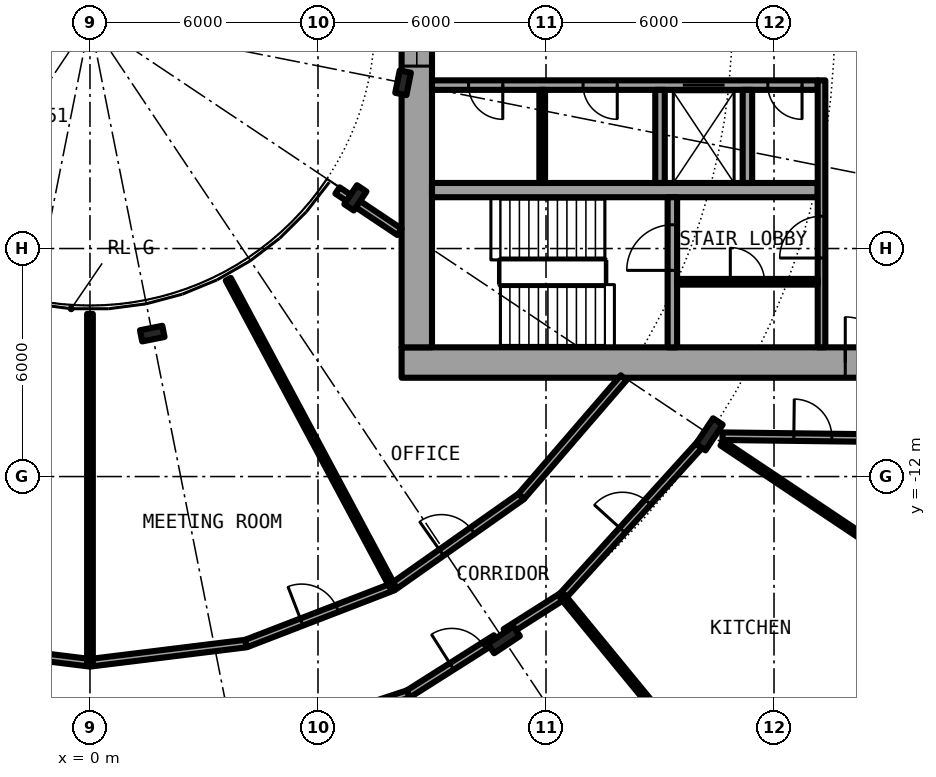
"""IFC4 building model, lengths in metres.
Left out: names, types, materials, properties, quantities, classifications, styles, units other than length and angle.
Written with IfcOpenShell. Run it as: python <this file> out.ifc"""

import sys

from ifc_helpers import new_model, si_unit, direction, frame, frame_2d, origin, origin_2d, place, context, subcontext, project, spatial, rectangle, i_section, extrude, element, fill, save


model = new_model("IFC4")
c1 = context("Model", 3, precision=1e-05, world=origin(), true_north=direction((0.0, 1.0)))
c2 = subcontext(c1, "Body", "Model", "MODEL_VIEW")
j1 = project(units=[si_unit("LENGTHUNIT", "METRE"), si_unit("PLANEANGLEUNIT", "RADIAN")], contexts=[c1])
p1 = place(None, origin())
s1 = spatial("IfcSite", under=j1, at=p1, CompositionType="ELEMENT")
p2 = place(p1, origin())
s2 = spatial("IfcBuilding", under=s1, at=p2, CompositionType="ELEMENT")
p3 = place(p2, frame((0.0, 0.0, 9.6)))
s3 = spatial("IfcBuildingStorey", under=s2, at=p3, CompositionType="ELEMENT", Elevation=9.6)
for number, where, z_axis, x_axis in (
    (1, (10.889, -16.297, 0.0), (0.0, 0.0, 1.0), (0.556, -0.831, 0.0)),
    (2, (16.297, -10.889, 0.0), (0.0, 0.0, 1.0), (0.831, -0.556, 0.0)),
):
    element("IfcColumn", number, at=place(p3, frame(where, z_axis=z_axis, x_axis=x_axis)), inside=s3, PredefinedType="COLUMN", context=c2, shape_type="SweptSolid", body=[
        extrude(i_section(OverallWidth=0.303, OverallDepth=0.814, WebThickness=0.021, FlangeThickness=0.04, FilletRadius=0.03, at=origin_2d()), origin(), (0.0, 0.0, 1.0), 4.5),
    ])
for number, where, z_axis, x_axis in (
    (3, (1.639, -8.239, 0.0), (0.0, 0.0, 1.0), (0.195, -0.981, 0.0)),
    (4, (6.984, -4.667, 0.0), (0.0, 0.0, 1.0), (0.831, -0.556, 0.0)),
    (5, (8.239, -1.639, 0.0), (0.0, 0.0, 1.0), (0.981, -0.195, 0.0)),
):
    element("IfcColumn", number, at=place(p3, frame(where, z_axis=z_axis, x_axis=x_axis)), inside=s3, PredefinedType="COLUMN", context=c2, shape_type="SweptSolid", body=[
        extrude(i_section(OverallWidth=0.3, OverallDepth=0.6, WebThickness=0.015, FlangeThickness=0.03, FilletRadius=0.027, at=origin_2d()), origin(), (0.0, 0.0, 1.0), 4.5),
    ])
p4 = place(p3, frame((8.2, -9.0, 0.0), z_axis=(0.0, 0.0, 1.0), x_axis=(1.0, 0.0, 0.0)))
e6 = element("IfcWall", 6, at=p4, inside=s3, PredefinedType="SHEAR", context=c2, shape_type="SweptSolid", body=[
    extrude(rectangle(XDim=14.2, YDim=0.8, at=frame_2d((7.1, 0.0))), origin(), (0.0, 0.0, 1.0), 4.5),
])
p5 = place(p4, frame((11.675, 0.0, 0.0)))
e7 = element("IfcOpeningElement", 7, at=p5, cuts=e6, PredefinedType="OPENING", context=c2, shape_type="SweptSolid", body=[
    extrude(rectangle(XDim=1.2, YDim=2.3, at=frame_2d((0.6, 1.15))), frame((0.0, 0.41, 0.0), z_axis=(0.0, -1.0, 0.0), x_axis=(1.0, 0.0, 0.0)), (0.0, 0.0, 1.0), 0.82),
])
p6 = place(p3, frame((8.6, -8.6, 0.0), z_axis=(0.0, 0.0, 1.0), x_axis=(0.0, 1.0, 0.0)))
e8 = element("IfcWall", 8, at=p6, inside=s3, PredefinedType="SHEAR", context=c2, shape_type="SweptSolid", body=[
    extrude(rectangle(XDim=17.2, YDim=0.8, at=frame_2d((8.6, 0.0))), origin(), (0.0, 0.0, 1.0), 4.5),
])
p7 = place(p6, frame((7.4, 0.0, 0.1)))
e9 = element("IfcOpeningElement", 9, at=p7, cuts=e8, PredefinedType="OPENING", context=c2, shape_type="SweptSolid", body=[
    extrude(rectangle(XDim=2.4, YDim=2.2, at=frame_2d((1.2, 1.1))), frame((0.0, 0.41, 0.0), z_axis=(0.0, -1.0, 0.0), x_axis=(1.0, 0.0, 0.0)), (0.0, 0.0, 1.0), 0.82),
])
p8 = place(p3, frame((19.15, -1.7, 0.0), z_axis=(0.0, 0.0, 1.0), x_axis=(-1.0, 0.0, 0.0)))
e10 = element("IfcWall", 10, at=p8, inside=s3, PredefinedType="SHEAR", context=c2, shape_type="SweptSolid", body=[
    extrude(rectangle(XDim=10.15, YDim=0.25, at=frame_2d((5.075, 0.0))), origin(), (0.0, 0.0, 1.0), 4.5),
])
p9 = place(p8, frame((2.45, 0.0, 0.0)))
e11 = element("IfcOpeningElement", 11, at=p9, cuts=e10, PredefinedType="OPENING", context=c2, shape_type="SweptSolid", body=[
    extrude(rectangle(XDim=1.1, YDim=2.3, at=frame_2d((0.55, 1.15))), frame((0.0, 0.135, 0.0), z_axis=(0.0, -1.0, 0.0), x_axis=(1.0, 0.0, 0.0)), (0.0, 0.0, 1.0), 0.27),
])
p10 = place(p8, frame((8.288, 0.0, 0.0)))
e12 = element("IfcOpeningElement", 12, at=p10, cuts=e10, PredefinedType="OPENING", context=c2, shape_type="SweptSolid", body=[
    extrude(rectangle(XDim=0.9, YDim=2.3, at=frame_2d((0.45, 1.15))), frame((0.0, 0.135, 0.0), z_axis=(0.0, -1.0, 0.0), x_axis=(1.0, 0.0, 0.0)), (0.0, 0.0, 1.0), 0.27),
])
p11 = place(p8, frame((5.275, 0.0, 0.0)))
e13 = element("IfcOpeningElement", 13, at=p11, cuts=e10, PredefinedType="OPENING", context=c2, shape_type="SweptSolid", body=[
    extrude(rectangle(XDim=0.9, YDim=2.3, at=frame_2d((0.45, 1.15))), frame((0.0, 0.135, 0.0), z_axis=(0.0, -1.0, 0.0), x_axis=(1.0, 0.0, 0.0)), (0.0, 0.0, 1.0), 0.27),
])
p12 = place(p8, frame((0.413, 0.0, 0.0)))
e14 = element("IfcOpeningElement", 14, at=p12, cuts=e10, PredefinedType="OPENING", context=c2, shape_type="SweptSolid", body=[
    extrude(rectangle(XDim=0.9, YDim=2.3, at=frame_2d((0.45, 1.15))), frame((0.0, 0.135, 0.0), z_axis=(0.0, -1.0, 0.0), x_axis=(1.0, 0.0, 0.0)), (0.0, 0.0, 1.0), 0.27),
])
p13 = place(p3, frame((9.0, -4.462, 0.0), z_axis=(0.0, 0.0, 1.0), x_axis=(1.0, 0.0, 0.0)))
e15 = element("IfcWall", 15, at=p13, inside=s3, PredefinedType="SHEAR", context=c2, shape_type="SweptSolid", body=[
    extrude(rectangle(XDim=10.15, YDim=0.375, at=frame_2d((5.075, 0.0))), origin(), (0.0, 0.0, 1.0), 4.5),
])
p14 = place(p3, frame((15.325, -8.6, 0.0), z_axis=(0.0, 0.0, 1.0), x_axis=(0.0, 1.0, 0.0)))
e16 = element("IfcWall", 16, at=p14, inside=s3, PredefinedType="SHEAR", context=c2, shape_type="SweptSolid", body=[
    extrude(rectangle(XDim=3.95, YDim=0.25, at=frame_2d((1.975, 0.0))), origin(), (0.0, 0.0, 1.0), 4.5),
])
p15 = place(p14, frame((2.025, 0.0, 0.0)))
e17 = element("IfcOpeningElement", 17, at=p15, cuts=e16, PredefinedType="OPENING", context=c2, shape_type="SweptSolid", body=[
    extrude(rectangle(XDim=1.2, YDim=2.3, at=frame_2d((0.6, 1.15))), frame((0.0, 0.135, 0.0), z_axis=(0.0, -1.0, 0.0), x_axis=(1.0, 0.0, 0.0)), (0.0, 0.0, 1.0), 0.27),
])
for number, where, z_axis, x_axis in (
    (18, (15.0, -1.825, 0.0), (0.0, 0.0, 1.0), (0.0, -1.0, 0.0)),
    (19, (17.3, -1.825, 0.0), (0.0, 0.0, 1.0), (0.0, -1.0, 0.0)),
):
    element("IfcWall", number, at=place(p3, frame(where, z_axis=z_axis, x_axis=x_axis)), inside=s3, PredefinedType="SOLIDWALL", context=c2, shape_type="SweptSolid", body=[
        extrude(rectangle(XDim=2.45, YDim=0.25, at=frame_2d((1.225, 0.0))), origin(), (0.0, 0.0, 1.0), 4.05),
    ])
p16 = place(p3, frame((19.25, -8.6, 0.0), z_axis=(0.0, 0.0, 1.0), x_axis=(0.0, 1.0, 0.0)))
e20 = element("IfcWall", 20, at=p16, inside=s3, PredefinedType="SOLIDWALL", context=c2, shape_type="SweptSolid", body=[
    extrude(rectangle(XDim=7.025, YDim=0.2, at=frame_2d((3.513, 0.0))), origin(), (0.0, 0.0, 1.0), 4.05),
])
p17 = place(p16, frame((2.35, 0.0, 0.0)))
e21 = element("IfcOpeningElement", 21, at=p17, cuts=e20, PredefinedType="OPENING", context=c2, shape_type="SweptSolid", body=[
    extrude(rectangle(XDim=1.1, YDim=2.3, at=frame_2d((0.55, 1.15))), frame((0.0, 0.11, 0.0), z_axis=(0.0, -1.0, 0.0), x_axis=(1.0, 0.0, 0.0)), (0.0, 0.0, 1.0), 0.22),
])
p18 = place(p3, frame((11.9, -1.825, 0.0), z_axis=(0.0, 0.0, 1.0), x_axis=(0.0, -1.0, 0.0)))
e22 = element("IfcWall", 22, at=p18, inside=s3, PredefinedType="PARTITIONING", context=c2, shape_type="SweptSolid", body=[
    extrude(rectangle(XDim=2.45, YDim=0.15, at=frame_2d((1.225, 0.0))), origin(), (0.0, 0.0, 1.0), 4.05),
])
p19 = place(p3, frame((15.45, -6.875, 0.0), z_axis=(0.0, 0.0, 1.0), x_axis=(1.0, 0.0, 0.0)))
e23 = element("IfcWall", 23, at=p19, inside=s3, PredefinedType="PARTITIONING", context=c2, shape_type="SweptSolid", body=[
    extrude(rectangle(XDim=3.7, YDim=0.15, at=frame_2d((1.85, 0.0))), origin(), (0.0, 0.0, 1.0), 4.05),
])
p20 = place(p19, frame((1.4, 0.0, 0.0)))
e24 = element("IfcOpeningElement", 24, at=p20, cuts=e23, PredefinedType="OPENING", context=c2, shape_type="SweptSolid", body=[
    extrude(rectangle(XDim=0.9, YDim=2.3, at=frame_2d((0.45, 1.15))), frame((0.0, 0.085, 0.0), z_axis=(0.0, -1.0, 0.0), x_axis=(1.0, 0.0, 0.0)), (0.0, 0.0, 1.0), 0.17),
])
p21 = place(p3, frame((4.625, -18.958, 0.0), z_axis=(0.0, 0.0, 1.0), x_axis=(0.949562483826, 0.313577883963, 0.0)))
e25 = element("IfcWall", 25, at=p21, inside=s3, PredefinedType="PARTITIONING", context=c2, shape_type="SweptSolid", body=[
    extrude(rectangle(XDim=3.954, YDim=0.2, at=frame_2d((1.977, 0.0))), origin(), (0.0, 0.0, 1.0), 3.63),
])
p22 = place(p3, frame((8.38, -17.718, 0.0), z_axis=(0.0, 0.0, 1.0), x_axis=(0.844806925432, 0.535071265106, 0.0)))
e26 = element("IfcWall", 26, at=p22, inside=s3, PredefinedType="PARTITIONING", context=c2, shape_type="SweptSolid", body=[
    extrude(rectangle(XDim=2.725, YDim=0.2, at=frame_2d((1.362, 0.0))), origin(), (0.0, 0.0, 1.0), 3.63),
])
p23 = place(p22, frame((1.35, 0.0, 0.0)))
e27 = element("IfcOpeningElement", 27, at=p23, cuts=e26, PredefinedType="OPENING", context=c2, shape_type="SweptSolid", body=[
    extrude(rectangle(XDim=1.0, YDim=2.3, at=frame_2d((0.5, 1.15))), frame((0.0, 0.11, 0.0), z_axis=(0.0, -1.0, 0.0), x_axis=(1.0, 0.0, 0.0)), (0.0, 0.0, 1.0), 0.22),
])
p24 = place(p3, frame((10.939, -16.098, 0.0), z_axis=(0.0, 0.0, 1.0), x_axis=(0.844789975167, 0.5350980264, 0.0)))
e28 = element("IfcWall", 28, at=p24, inside=s3, PredefinedType="PARTITIONING", context=c2, shape_type="SweptSolid", body=[
    extrude(rectangle(XDim=1.77, YDim=0.2, at=frame_2d((0.885, 0.0))), origin(), (0.0, 0.0, 1.0), 3.63),
])
p25 = place(p3, frame((12.434, -15.151, 0.0), z_axis=(0.0, 0.0, 1.0), x_axis=(0.671610704694, 0.740904218736, 0.0)))
e29 = element("IfcWall", 29, at=p25, inside=s3, PredefinedType="PARTITIONING", context=c2, shape_type="SweptSolid", body=[
    extrude(rectangle(XDim=5.598, YDim=0.2, at=frame_2d((2.799, 0.0))), origin(), (0.0, 0.0, 1.0), 3.63),
])
p26 = place(p25, frame((2.346, 0.0, 0.0)))
e30 = element("IfcOpeningElement", 30, at=p26, cuts=e29, PredefinedType="OPENING", context=c2, shape_type="SweptSolid", body=[
    extrude(rectangle(XDim=1.0, YDim=2.3, at=frame_2d((0.5, 1.15))), frame((0.0, 0.11, 0.0), z_axis=(0.0, -1.0, 0.0), x_axis=(1.0, 0.0, 0.0)), (0.0, 0.0, 1.0), 0.22),
])
for number, where, z_axis, x_axis in (
    (31, (-4.106, -16.394, 0.0), (0.0, 0.0, 1.0), (0.992, -0.122, 0.0)),
    (32, (0.0, -16.9, 0.0), (0.0, 0.0, 1.0), (0.992, 0.122, 0.0)),
):
    element("IfcWall", number, at=place(p3, frame(where, z_axis=z_axis, x_axis=x_axis)), inside=s3, PredefinedType="PARTITIONING", context=c2, shape_type="SweptSolid", body=[
        extrude(rectangle(XDim=4.137, YDim=0.2, at=frame_2d((2.068, 0.0))), origin(), (0.0, 0.0, 1.0), 4.05),
    ])
p27 = place(p3, frame((4.106, -16.394, 0.0), z_axis=(0.0, 0.0, 1.0), x_axis=(0.932943640288, 0.360022449363, 0.0)))
e33 = element("IfcWall", 33, at=p27, inside=s3, PredefinedType="PARTITIONING", context=c2, shape_type="SweptSolid", body=[
    extrude(rectangle(XDim=4.139, YDim=0.2, at=frame_2d((2.069, 0.0))), origin(), (0.0, 0.0, 1.0), 4.05),
])
p28 = place(p27, frame((1.569, 0.0, 0.0)))
e34 = element("IfcOpeningElement", 34, at=p28, cuts=e33, PredefinedType="OPENING", context=c2, shape_type="SweptSolid", body=[
    extrude(rectangle(XDim=1.0, YDim=2.3, at=frame_2d((0.5, 1.15))), frame((0.0, 0.11, 0.0), z_axis=(0.0, -1.0, 0.0), x_axis=(1.0, 0.0, 0.0)), (0.0, 0.0, 1.0), 0.22),
])
p29 = place(p3, frame((7.967, -14.904, 0.0), z_axis=(0.0, 0.0, 1.0), x_axis=(0.817567680547, 0.575832517079, 0.0)))
e35 = element("IfcWall", 35, at=p29, inside=s3, PredefinedType="PARTITIONING", context=c2, shape_type="SweptSolid", body=[
    extrude(rectangle(XDim=4.137, YDim=0.2, at=frame_2d((2.068, 0.0))), origin(), (0.0, 0.0, 1.0), 4.05),
])
p30 = place(p29, frame((1.568, 0.0, 0.0)))
e36 = element("IfcOpeningElement", 36, at=p30, cuts=e35, PredefinedType="OPENING", context=c2, shape_type="SweptSolid", body=[
    extrude(rectangle(XDim=1.0, YDim=2.3, at=frame_2d((0.5, 1.15))), frame((0.0, 0.11, 0.0), z_axis=(0.0, -1.0, 0.0), x_axis=(1.0, 0.0, 0.0)), (0.0, 0.0, 1.0), 0.22),
])
p31 = place(p3, frame((11.349, -12.522, 0.0), z_axis=(0.0, 0.0, 1.0), x_axis=(0.653274518104, 0.757121129012, 0.0)))
e37 = element("IfcWall", 37, at=p31, inside=s3, PredefinedType="PARTITIONING", context=c2, shape_type="SweptSolid", body=[
    extrude(rectangle(XDim=4.124, YDim=0.2, at=frame_2d((2.062, 0.0))), origin(), (0.0, 0.0, 1.0), 4.05),
])
p32 = place(p3, frame((16.643, -10.938, 0.0), z_axis=(0.0, 0.0, 1.0), x_axis=(0.999924074118, -0.012322580895, 0.0)))
e38 = element("IfcWall", 38, at=p32, inside=s3, PredefinedType="PARTITIONING", context=c2, shape_type="SweptSolid", body=[
    extrude(rectangle(XDim=5.032, YDim=0.2, at=frame_2d((2.516, 0.0))), origin(), (0.0, 0.0, 1.0), 4.05),
])
p33 = place(p32, frame((1.878, 0.0, 0.0)))
e39 = element("IfcOpeningElement", 39, at=p33, cuts=e38, PredefinedType="OPENING", context=c2, shape_type="SweptSolid", body=[
    extrude(rectangle(XDim=1.0, YDim=2.3, at=frame_2d((0.5, 1.15))), frame((0.0, 0.11, 0.0), z_axis=(0.0, -1.0, 0.0), x_axis=(1.0, 0.0, 0.0)), (0.0, 0.0, 1.0), 0.22),
])
p34 = place(p3, frame((6.513, -4.472, 0.0), z_axis=(0.0, 0.0, 1.0), x_axis=(0.831417956244, -0.555647533996, 0.0)))
e40 = element("IfcWall", 40, at=p34, inside=s3, PredefinedType="PARTITIONING", context=c2, shape_type="SweptSolid", body=[
    extrude(rectangle(XDim=1.962, YDim=0.2, at=frame_2d((0.981, 0.0))), origin(), (0.0, 0.0, 1.0), 4.05),
])
p35 = place(p3, frame((0.0, -16.9, 0.0), z_axis=(0.0, 0.0, 1.0), x_axis=(0.0, 1.0, 0.0)))
e41 = element("IfcWall", 41, at=p35, inside=s3, PredefinedType="PARTITIONING", context=c2, shape_type="SweptSolid", body=[
    extrude(rectangle(XDim=9.18, YDim=0.15, at=frame_2d((4.59, 0.0))), origin(), (0.0, 0.0, 1.0), 4.05),
])
p36 = place(p3, frame((3.639, -6.808, 0.0), z_axis=(0.0, 0.0, 1.0), x_axis=(0.471460365694, -0.881887251059, 0.0)))
e42 = element("IfcWall", 42, at=p36, inside=s3, PredefinedType="PARTITIONING", context=c2, shape_type="SweptSolid", body=[
    extrude(rectangle(XDim=9.18, YDim=0.15, at=frame_2d((4.59, 0.0))), origin(), (0.0, 0.0, 1.0), 4.05),
])
p37 = place(p3, frame((12.434, -15.151, 0.0), z_axis=(0.0, 0.0, 1.0), x_axis=(0.634381303318, -0.773020285633, 0.0)))
e43 = element("IfcWall", 43, at=p37, inside=s3, PredefinedType="PARTITIONING", context=c2, shape_type="SweptSolid", body=[
    extrude(rectangle(XDim=7.576, YDim=0.15, at=frame_2d((3.788, 0.0))), origin(), (0.0, 0.0, 1.0), 4.05),
])
p38 = place(p3, frame((16.633, -11.118, 0.0), z_axis=(0.0, 0.0, 1.0), x_axis=(0.831415754305, -0.555650828752, 0.0)))
e44 = element("IfcWall", 44, at=p38, inside=s3, PredefinedType="PARTITIONING", context=c2, shape_type="SweptSolid", body=[
    extrude(rectangle(XDim=7.168, YDim=0.15, at=frame_2d((3.584, 0.0))), origin(), (0.0, 0.0, 1.0), 4.05),
])
p39 = place(p9, origin())
e45 = element("IfcDoor", 45, at=p39, inside=s3, OperationType="DOUBLE_DOOR_SLIDING", PredefinedType="DOOR", context=c2, shape_type="SweptSolid", body=[
    extrude(rectangle(XDim=1.1, YDim=2.3, at=frame_2d((0.55, 1.15))), frame((0.0, 0.025, 0.0), z_axis=(0.0, -1.0, 0.0), x_axis=(1.0, 0.0, 0.0)), (0.0, 0.0, 1.0), 0.05),
])
fill(e11, e45)
p40 = place(p10, origin())
e46 = element("IfcDoor", 46, at=p40, inside=s3, OperationType="SINGLE_SWING_LEFT", PredefinedType="DOOR", context=c2, shape_type="SweptSolid", body=[
    extrude(rectangle(XDim=0.9, YDim=2.3, at=frame_2d((0.45, 1.15))), frame((0.0, 0.025, 0.0), z_axis=(0.0, -1.0, 0.0), x_axis=(1.0, 0.0, 0.0)), (0.0, 0.0, 1.0), 0.05),
])
fill(e12, e46)
p41 = place(p11, origin())
e47 = element("IfcDoor", 47, at=p41, inside=s3, OperationType="SINGLE_SWING_LEFT", PredefinedType="DOOR", context=c2, shape_type="SweptSolid", body=[
    extrude(rectangle(XDim=0.9, YDim=2.3, at=frame_2d((0.45, 1.15))), frame((0.0, 0.025, 0.0), z_axis=(0.0, -1.0, 0.0), x_axis=(1.0, 0.0, 0.0)), (0.0, 0.0, 1.0), 0.05),
])
fill(e13, e47)
p42 = place(p12, origin())
e48 = element("IfcDoor", 48, at=p42, inside=s3, OperationType="SINGLE_SWING_RIGHT", PredefinedType="DOOR", context=c2, shape_type="SweptSolid", body=[
    extrude(rectangle(XDim=0.9, YDim=2.3, at=frame_2d((0.45, 1.15))), frame((0.0, 0.025, 0.0), z_axis=(0.0, -1.0, 0.0), x_axis=(1.0, 0.0, 0.0)), (0.0, 0.0, 1.0), 0.05),
])
fill(e14, e48)
p43 = place(p20, origin())
e49 = element("IfcDoor", 49, at=p43, inside=s3, OperationType="SINGLE_SWING_LEFT", PredefinedType="DOOR", context=c2, shape_type="SweptSolid", body=[
    extrude(rectangle(XDim=0.9, YDim=2.3, at=frame_2d((0.45, 1.15))), frame((0.0, 0.025, 0.0), z_axis=(0.0, -1.0, 0.0), x_axis=(1.0, 0.0, 0.0)), (0.0, 0.0, 1.0), 0.05),
])
fill(e24, e49)
p44 = place(p15, origin())
e50 = element("IfcDoor", 50, at=p44, inside=s3, OperationType="SINGLE_SWING_LEFT", PredefinedType="DOOR", context=c2, shape_type="SweptSolid", body=[
    extrude(rectangle(XDim=1.2, YDim=2.3, at=frame_2d((0.6, 1.15))), frame((0.0, 0.025, 0.0), z_axis=(0.0, -1.0, 0.0), x_axis=(1.0, 0.0, 0.0)), (0.0, 0.0, 1.0), 0.05),
])
fill(e17, e50)
p45 = place(p17, origin())
e51 = element("IfcDoor", 51, at=p45, inside=s3, OperationType="SINGLE_SWING_RIGHT", PredefinedType="DOOR", context=c2, shape_type="SweptSolid", body=[
    extrude(rectangle(XDim=1.1, YDim=2.3, at=frame_2d((0.55, 1.15))), frame((0.0, 0.025, 0.0), z_axis=(0.0, -1.0, 0.0), x_axis=(1.0, 0.0, 0.0)), (0.0, 0.0, 1.0), 0.05),
])
fill(e21, e51)
p46 = place(p5, origin())
e52 = element("IfcDoor", 52, at=p46, inside=s3, OperationType="SINGLE_SWING_LEFT", PredefinedType="DOOR", context=c2, shape_type="SweptSolid", body=[
    extrude(rectangle(XDim=1.2, YDim=2.3, at=frame_2d((0.6, 1.15))), frame((0.0, 0.025, 0.0), z_axis=(0.0, -1.0, 0.0), x_axis=(1.0, 0.0, 0.0)), (0.0, 0.0, 1.0), 0.05),
])
fill(e7, e52)
p47 = place(p7, origin())
e53 = element("IfcWindow", 53, at=p47, inside=s3, PartitioningType="SINGLE_PANEL", PredefinedType="WINDOW", context=c2, shape_type="SweptSolid", body=[
    extrude(rectangle(XDim=2.4, YDim=2.2, at=frame_2d((1.2, 1.1))), frame((0.0, 0.03, 0.0), z_axis=(0.0, -1.0, 0.0), x_axis=(1.0, 0.0, 0.0)), (0.0, 0.0, 1.0), 0.06),
])
fill(e9, e53)
p48 = place(p23, origin())
e54 = element("IfcDoor", 54, at=p48, inside=s3, OperationType="SINGLE_SWING_RIGHT", PredefinedType="DOOR", context=c2, shape_type="SweptSolid", body=[
    extrude(rectangle(XDim=1.0, YDim=2.3, at=frame_2d((0.5, 1.15))), frame((0.0, 0.025, 0.0), z_axis=(0.0, -1.0, 0.0), x_axis=(1.0, 0.0, 0.0)), (0.0, 0.0, 1.0), 0.05),
])
fill(e27, e54)
p49 = place(p26, origin())
e55 = element("IfcDoor", 55, at=p49, inside=s3, OperationType="SINGLE_SWING_RIGHT", PredefinedType="DOOR", context=c2, shape_type="SweptSolid", body=[
    extrude(rectangle(XDim=1.0, YDim=2.3, at=frame_2d((0.5, 1.15))), frame((0.0, 0.025, 0.0), z_axis=(0.0, -1.0, 0.0), x_axis=(1.0, 0.0, 0.0)), (0.0, 0.0, 1.0), 0.05),
])
fill(e30, e55)
p50 = place(p28, origin())
e56 = element("IfcDoor", 56, at=p50, inside=s3, OperationType="SINGLE_SWING_RIGHT", PredefinedType="DOOR", context=c2, shape_type="SweptSolid", body=[
    extrude(rectangle(XDim=1.0, YDim=2.3, at=frame_2d((0.5, 1.15))), frame((0.0, 0.025, 0.0), z_axis=(0.0, -1.0, 0.0), x_axis=(1.0, 0.0, 0.0)), (0.0, 0.0, 1.0), 0.05),
])
fill(e34, e56)
p51 = place(p30, origin())
e57 = element("IfcDoor", 57, at=p51, inside=s3, OperationType="SINGLE_SWING_RIGHT", PredefinedType="DOOR", context=c2, shape_type="SweptSolid", body=[
    extrude(rectangle(XDim=1.0, YDim=2.3, at=frame_2d((0.5, 1.15))), frame((0.0, 0.025, 0.0), z_axis=(0.0, -1.0, 0.0), x_axis=(1.0, 0.0, 0.0)), (0.0, 0.0, 1.0), 0.05),
])
fill(e36, e57)
p52 = place(p33, origin())
e58 = element("IfcDoor", 58, at=p52, inside=s3, OperationType="SINGLE_SWING_LEFT", PredefinedType="DOOR", context=c2, shape_type="SweptSolid", body=[
    extrude(rectangle(XDim=1.0, YDim=2.3, at=frame_2d((0.5, 1.15))), frame((0.0, 0.025, 0.0), z_axis=(0.0, -1.0, 0.0), x_axis=(1.0, 0.0, 0.0)), (0.0, 0.0, 1.0), 0.05),
])
fill(e39, e58)
save(model, sys.argv[1])
